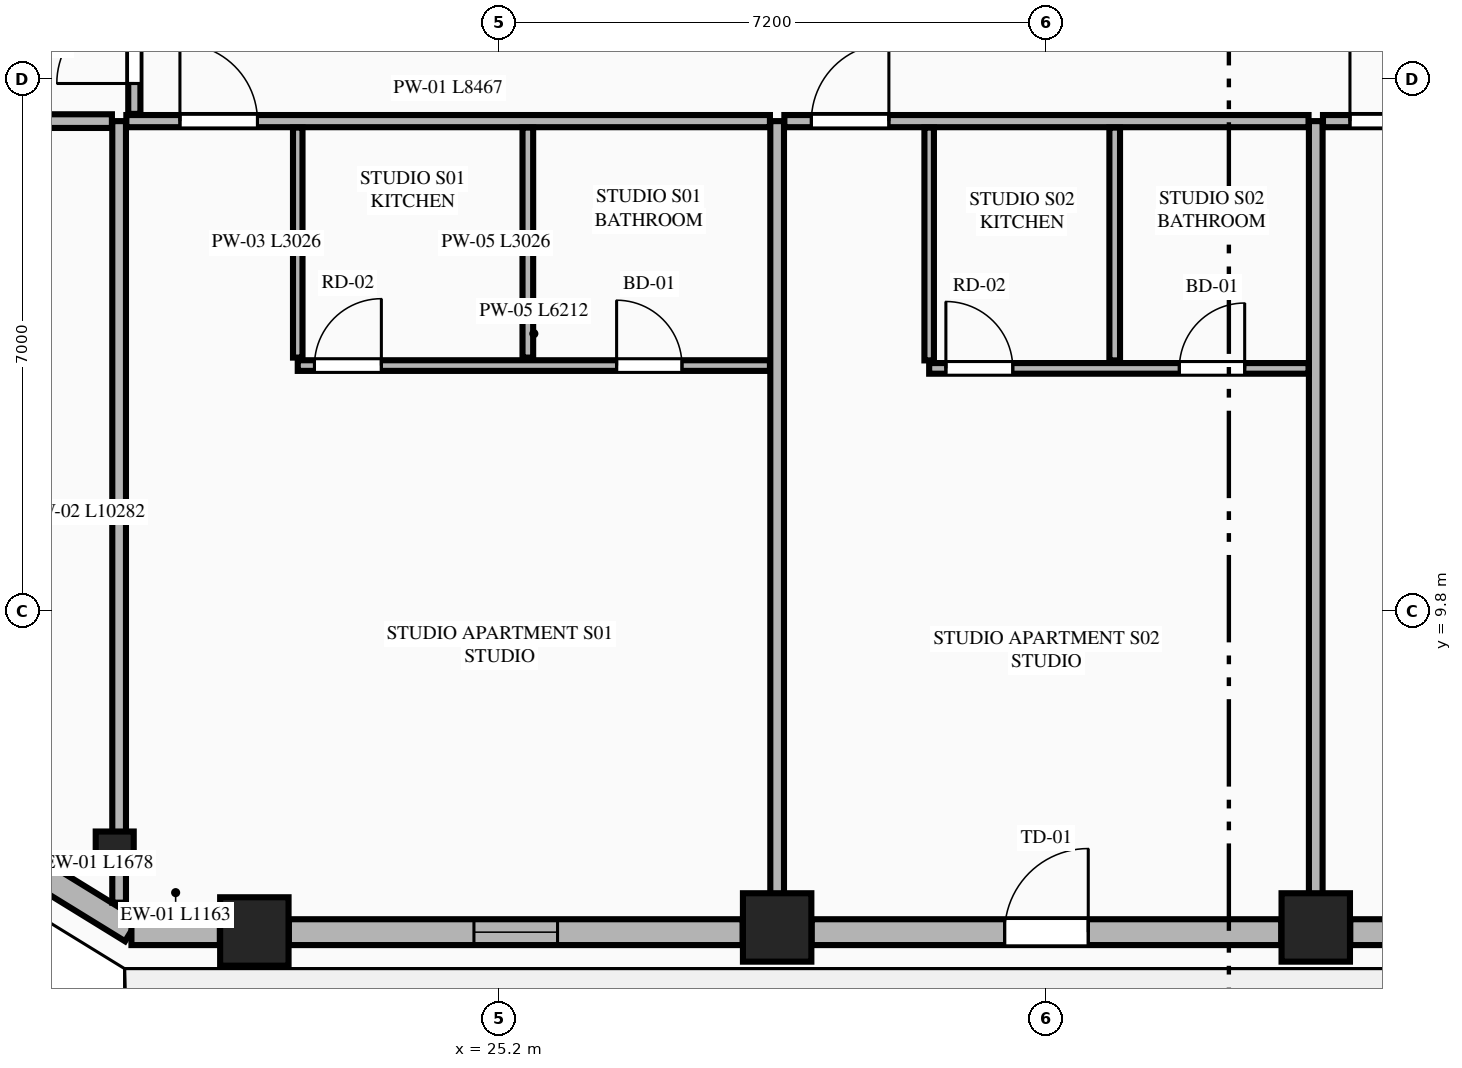
"""IFC4 building model, lengths in metres.
Left out: names, types, materials, properties, quantities, classifications, styles, units other than length and angle.
Written with IfcOpenShell. Run it as: python <this file> out.ifc"""

import sys

from ifc_helpers import new_model, si_unit, direction, frame, frame_2d, origin, origin_2d, place, context, subcontext, project, spatial, rectangle, extrude, element, fill, save


model = new_model("IFC4")
c1 = context("Model", 3, precision=1e-05, world=origin(), true_north=direction((0.0, 1.0)))
c2 = subcontext(c1, "Body", "Model", "MODEL_VIEW")
j1 = project(units=[si_unit("LENGTHUNIT", "METRE"), si_unit("PLANEANGLEUNIT", "RADIAN")], contexts=[c1])
p1 = place(None, origin())
s1 = spatial("IfcSite", under=j1, at=p1, CompositionType="ELEMENT")
p2 = place(p1, origin())
s2 = spatial("IfcBuilding", under=s1, at=p2, CompositionType="ELEMENT")
p3 = place(p2, frame((0.0, 0.0, 203.85)))
s3 = spatial("IfcBuildingStorey", under=s2, at=p3, CompositionType="ELEMENT", Elevation=203.85)
for number, where, z_axis, x_axis in (
    (1, (21.979, 5.589, 0.0), (0.0, 0.0, 1.0), (1.0, 0.0, 0.0)),
    (2, (28.857, 5.642, 0.0), (0.0, 0.0, 1.0), (1.0, 0.0, 0.0)),
    (3, (35.943, 5.642, 0.0), (0.0, 0.0, 1.0), (1.0, 0.0, 0.0)),
):
    element("IfcColumn", number, at=place(p3, frame(where, z_axis=z_axis, x_axis=x_axis)), inside=s3, PredefinedType="COLUMN", context=c2, shape_type="SweptSolid", body=[
        extrude(rectangle(XDim=0.9, YDim=0.9, at=origin_2d()), origin(), (0.0, 0.0, 1.0), 3.55),
    ])
p4 = place(p3, frame((20.142, 6.654, 0.0), z_axis=(0.0, 0.0, 1.0), x_axis=(0.865230187018, -0.501374833306, 0.0)))
e4 = element("IfcColumn", 4, at=p4, inside=s3, PredefinedType="PILASTER", context=c2, shape_type="SweptSolid", body=[
    extrude(rectangle(XDim=0.5, YDim=0.35, at=origin_2d()), origin(), (0.0, 0.0, 1.0), 3.55),
])
p5 = place(p3, frame((18.938, 6.484, 0.0), z_axis=(0.0, 0.0, 1.0), x_axis=(0.851778214877, -0.523902541185, 0.0)))
e5 = element("IfcWall", 5, at=p5, inside=s3, PredefinedType="STANDARD", context=c2, shape_type="SweptSolid", body=[
    extrude(rectangle(XDim=1.678, YDim=0.34, at=frame_2d((0.839, 0.0))), origin(), (0.0, 0.0, 1.0), 3.35),
])
p6 = place(p3, frame((20.362, 5.58, 0.0), z_axis=(0.0, 0.0, 1.0), x_axis=(1.0, 0.0, 0.0)))
e6 = element("IfcWall", 6, at=p6, inside=s3, PredefinedType="STANDARD", context=c2, shape_type="SweptSolid", body=[
    extrude(rectangle(XDim=1.163, YDim=0.34, at=frame_2d((0.582, 0.0))), origin(), (0.0, 0.0, 1.0), 3.35),
])
p7 = place(p3, frame((22.433, 5.58, 0.0), z_axis=(0.0, 0.0, 1.0), x_axis=(1.0, 0.0, 0.0)))
e7 = element("IfcWall", 7, at=p7, inside=s3, PredefinedType="STANDARD", context=c2, shape_type="SweptSolid", body=[
    extrude(rectangle(XDim=5.97, YDim=0.34, at=frame_2d((2.985, 0.0))), origin(), (0.0, 0.0, 1.0), 2.883),
])
p8 = place(p7, frame((2.435, 0.0, 0.75)))
e8 = element("IfcOpeningElement", 8, at=p8, cuts=e7, PredefinedType="OPENING", context=c2, shape_type="SweptSolid", body=[
    extrude(rectangle(XDim=1.1, YDim=1.983, at=frame_2d((0.55, 0.991))), frame((0.0, 0.18, 0.0), z_axis=(0.0, -1.0, 0.0), x_axis=(1.0, 0.0, 0.0)), (0.0, 0.0, 1.0), 0.36),
])
p9 = place(p3, frame((29.311, 5.58, 0.0), z_axis=(0.0, 0.0, 1.0), x_axis=(1.0, 0.0, 0.0)))
e9 = element("IfcWall", 9, at=p9, inside=s3, PredefinedType="STANDARD", context=c2, shape_type="SweptSolid", body=[
    extrude(rectangle(XDim=6.178, YDim=0.34, at=frame_2d((3.089, 0.0))), origin(), (0.0, 0.0, 1.0), 2.883),
])
p10 = place(p9, frame((2.539, 0.0, 0.0)))
e10 = element("IfcOpeningElement", 10, at=p10, cuts=e9, PredefinedType="OPENING", context=c2, shape_type="SweptSolid", body=[
    extrude(rectangle(XDim=1.1, YDim=2.25, at=frame_2d((0.55, 1.125))), frame((0.0, 0.18, 0.0), z_axis=(0.0, -1.0, 0.0), x_axis=(1.0, 0.0, 0.0)), (0.0, 0.0, 1.0), 0.36),
])
p11 = place(p3, frame((36.397, 5.58, 0.0), z_axis=(0.0, 0.0, 1.0), x_axis=(1.0, 0.0, 0.0)))
e11 = element("IfcWall", 11, at=p11, inside=s3, PredefinedType="STANDARD", context=c2, shape_type="SweptSolid", body=[
    extrude(rectangle(XDim=5.97, YDim=0.34, at=frame_2d((2.985, 0.0))), origin(), (0.0, 0.0, 1.0), 2.883),
])
p12 = place(p11, frame((2.36, 0.0, 0.75)))
e12 = element("IfcOpeningElement", 12, at=p12, cuts=e11, PredefinedType="OPENING", context=c2, shape_type="SweptSolid", body=[
    extrude(rectangle(XDim=1.25, YDim=1.95, at=frame_2d((0.625, 0.975))), frame((0.0, 0.18, 0.0), z_axis=(0.0, -1.0, 0.0), x_axis=(1.0, 0.0, 0.0)), (0.0, 0.0, 1.0), 0.36),
])
p13 = place(p3, frame((20.2, 5.968, 0.0), z_axis=(0.0, 0.0, 1.0), x_axis=(0.0, 1.0, 0.0)))
e13 = element("IfcWall", 13, at=p13, inside=s3, PredefinedType="PARTITIONING", context=c2, shape_type="SweptSolid", body=[
    extrude(rectangle(XDim=10.282, YDim=0.18, at=frame_2d((5.141, 0.0))), origin(), (0.0, 0.0, 1.0), 3.35),
])
for number, where, z_axis, x_axis in (
    (14, (28.857, 5.755, 0.0), (0.0, 0.0, 1.0), (0.0, 1.0, 0.0)),
    (15, (35.943, 5.755, 0.0), (0.0, 0.0, 1.0), (0.0, 1.0, 0.0)),
):
    element("IfcWall", number, at=place(p3, frame(where, z_axis=z_axis, x_axis=x_axis)), inside=s3, PredefinedType="PARTITIONING", context=c2, shape_type="SweptSolid", body=[
        extrude(rectangle(XDim=10.495, YDim=0.18, at=frame_2d((5.248, 0.0))), origin(), (0.0, 0.0, 1.0), 2.807),
    ])
p14 = place(p3, frame((20.295, 16.25, 0.0), z_axis=(0.0, 0.0, 1.0), x_axis=(1.0, 0.0, 0.0)))
e16 = element("IfcWall", 16, at=p14, inside=s3, PredefinedType="PARTITIONING", context=c2, shape_type="SweptSolid", body=[
    extrude(rectangle(XDim=8.467, YDim=0.16, at=frame_2d((4.233, 0.0))), origin(), (0.0, 0.0, 1.0), 3.35),
])
p15 = place(p14, frame((0.705, 0.0, 0.0)))
e17 = element("IfcOpeningElement", 17, at=p15, cuts=e16, PredefinedType="OPENING", context=c2, shape_type="SweptSolid", body=[
    extrude(rectangle(XDim=1.02, YDim=2.25, at=frame_2d((0.51, 1.125))), frame((0.0, 0.09, 0.0), z_axis=(0.0, -1.0, 0.0), x_axis=(1.0, 0.0, 0.0)), (0.0, 0.0, 1.0), 0.18),
])
p16 = place(p3, frame((22.55, 13.139, 0.0), z_axis=(0.0, 0.0, 1.0), x_axis=(0.0, 1.0, 0.0)))
e18 = element("IfcWall", 18, at=p16, inside=s3, PredefinedType="PARTITIONING", context=c2, shape_type="SweptSolid", body=[
    extrude(rectangle(XDim=3.026, YDim=0.125, at=frame_2d((1.513, 0.0))), origin(), (0.0, 0.0, 1.0), 2.807),
])
p17 = place(p3, frame((22.55, 13.034, 0.0), z_axis=(0.0, 0.0, 1.0), x_axis=(1.0, 0.0, 0.0)))
e19 = element("IfcWall", 19, at=p17, inside=s3, PredefinedType="PLUMBINGWALL", context=c2, shape_type="SweptSolid", body=[
    extrude(rectangle(XDim=6.212, YDim=0.14, at=frame_2d((3.106, 0.0))), origin(), (0.0, 0.0, 1.0), 3.35),
])
p18 = place(p17, frame((4.195, 0.0, 0.0)))
e20 = element("IfcOpeningElement", 20, at=p18, cuts=e19, PredefinedType="OPENING", context=c2, shape_type="SweptSolid", body=[
    extrude(rectangle(XDim=0.86, YDim=2.1, at=frame_2d((0.43, 1.05))), frame((0.0, 0.08, 0.0), z_axis=(0.0, -1.0, 0.0), x_axis=(1.0, 0.0, 0.0)), (0.0, 0.0, 1.0), 0.16),
])
p19 = place(p17, frame((0.22, 0.0, 0.0)))
e21 = element("IfcOpeningElement", 21, at=p19, cuts=e19, PredefinedType="OPENING", context=c2, shape_type="SweptSolid", body=[
    extrude(rectangle(XDim=0.88, YDim=2.15, at=frame_2d((0.44, 1.075))), frame((0.0, 0.08, 0.0), z_axis=(0.0, -1.0, 0.0), x_axis=(1.0, 0.0, 0.0)), (0.0, 0.0, 1.0), 0.16),
])
p20 = place(p3, frame((25.577, 13.139, 0.0), z_axis=(0.0, 0.0, 1.0), x_axis=(0.0, 1.0, 0.0)))
e22 = element("IfcWall", 22, at=p20, inside=s3, PredefinedType="PLUMBINGWALL", context=c2, shape_type="SweptSolid", body=[
    extrude(rectangle(XDim=3.026, YDim=0.14, at=frame_2d((1.513, 0.0))), origin(), (0.0, 0.0, 1.0), 3.35),
])
p21 = place(p3, frame((28.952, 16.25, 0.0), z_axis=(0.0, 0.0, 1.0), x_axis=(1.0, 0.0, 0.0)))
e23 = element("IfcWall", 23, at=p21, inside=s3, PredefinedType="PARTITIONING", context=c2, shape_type="SweptSolid", body=[
    extrude(rectangle(XDim=6.896, YDim=0.16, at=frame_2d((3.448, 0.0))), origin(), (0.0, 0.0, 1.0), 3.35),
])
p22 = place(p21, frame((0.355, 0.0, 0.0)))
e24 = element("IfcOpeningElement", 24, at=p22, cuts=e23, PredefinedType="OPENING", context=c2, shape_type="SweptSolid", body=[
    extrude(rectangle(XDim=1.02, YDim=2.25, at=frame_2d((0.51, 1.125))), frame((0.0, 0.09, 0.0), z_axis=(0.0, -1.0, 0.0), x_axis=(1.0, 0.0, 0.0)), (0.0, 0.0, 1.0), 0.18),
])
p23 = place(p3, frame((30.857, 13.102, 0.0), z_axis=(0.0, 0.0, 1.0), x_axis=(0.0, 1.0, 0.0)))
e25 = element("IfcWall", 25, at=p23, inside=s3, PredefinedType="PARTITIONING", context=c2, shape_type="SweptSolid", body=[
    extrude(rectangle(XDim=3.063, YDim=0.125, at=frame_2d((1.531, 0.0))), origin(), (0.0, 0.0, 1.0), 3.35),
])
p24 = place(p3, frame((30.857, 12.997, 0.0), z_axis=(0.0, 0.0, 1.0), x_axis=(1.0, 0.0, 0.0)))
e26 = element("IfcWall", 26, at=p24, inside=s3, PredefinedType="PLUMBINGWALL", context=c2, shape_type="SweptSolid", body=[
    extrude(rectangle(XDim=4.991, YDim=0.14, at=frame_2d((2.496, 0.0))), origin(), (0.0, 0.0, 1.0), 3.35),
])
p25 = place(p24, frame((3.291, 0.0, 0.0)))
e27 = element("IfcOpeningElement", 27, at=p25, cuts=e26, PredefinedType="OPENING", context=c2, shape_type="SweptSolid", body=[
    extrude(rectangle(XDim=0.86, YDim=2.1, at=frame_2d((0.43, 1.05))), frame((0.0, 0.08, 0.0), z_axis=(0.0, -1.0, 0.0), x_axis=(1.0, 0.0, 0.0)), (0.0, 0.0, 1.0), 0.16),
])
p26 = place(p24, frame((0.22, 0.0, 0.0)))
e28 = element("IfcOpeningElement", 28, at=p26, cuts=e26, PredefinedType="OPENING", context=c2, shape_type="SweptSolid", body=[
    extrude(rectangle(XDim=0.88, YDim=2.15, at=frame_2d((0.44, 1.075))), frame((0.0, 0.08, 0.0), z_axis=(0.0, -1.0, 0.0), x_axis=(1.0, 0.0, 0.0)), (0.0, 0.0, 1.0), 0.16),
])
p27 = place(p3, frame((33.298, 13.102, 0.0), z_axis=(0.0, 0.0, 1.0), x_axis=(0.0, 1.0, 0.0)))
e29 = element("IfcWall", 29, at=p27, inside=s3, PredefinedType="PLUMBINGWALL", context=c2, shape_type="SweptSolid", body=[
    extrude(rectangle(XDim=3.063, YDim=0.14, at=frame_2d((1.531, 0.0))), origin(), (0.0, 0.0, 1.0), 3.35),
])
p28 = place(p3, frame((36.038, 16.25, 0.0), z_axis=(0.0, 0.0, 1.0), x_axis=(1.0, 0.0, 0.0)))
e30 = element("IfcWall", 30, at=p28, inside=s3, PredefinedType="PARTITIONING", context=c2, shape_type="SweptSolid", body=[
    extrude(rectangle(XDim=8.467, YDim=0.16, at=frame_2d((4.233, 0.0))), origin(), (0.0, 0.0, 1.0), 3.35),
])
p29 = place(p28, frame((0.355, 0.0, 0.0)))
e31 = element("IfcOpeningElement", 31, at=p29, cuts=e30, PredefinedType="OPENING", context=c2, shape_type="SweptSolid", body=[
    extrude(rectangle(XDim=1.02, YDim=2.25, at=frame_2d((0.51, 1.125))), frame((0.0, 0.09, 0.0), z_axis=(0.0, -1.0, 0.0), x_axis=(1.0, 0.0, 0.0)), (0.0, 0.0, 1.0), 0.18),
])
p30 = place(p3, frame((14.211, 16.25, 0.0), z_axis=(0.0, 0.0, 1.0), x_axis=(1.0, 0.0, 0.0)))
e32 = element("IfcWall", 32, at=p30, inside=s3, PredefinedType="PARTITIONING", context=c2, shape_type="SweptSolid", body=[
    extrude(rectangle(XDim=5.894, YDim=0.18, at=frame_2d((2.947, 0.0))), origin(), (0.0, 0.0, 1.0), 3.35),
])
p31 = place(p3, frame((20.4, 16.345, 0.0), z_axis=(0.0, 0.0, 1.0), x_axis=(0.0, 1.0, 0.0)))
e33 = element("IfcWall", 33, at=p31, inside=s3, PredefinedType="PARTITIONING", context=c2, shape_type="SweptSolid", body=[
    extrude(rectangle(XDim=6.236, YDim=0.16, at=frame_2d((3.118, 0.0))), origin(), (0.0, 0.0, 1.0), 3.35),
])
p32 = place(p31, frame((0.4, 0.0, 0.0)))
e34 = element("IfcOpeningElement", 34, at=p32, cuts=e33, PredefinedType="OPENING", context=c2, shape_type="SweptSolid", body=[
    extrude(rectangle(XDim=1.02, YDim=2.25, at=frame_2d((0.51, 1.125))), frame((0.0, 0.09, 0.0), z_axis=(0.0, -1.0, 0.0), x_axis=(1.0, 0.0, 0.0)), (0.0, 0.0, 1.0), 0.18),
])
p33 = place(p8, origin())
e35 = element("IfcWindow", 35, at=p33, inside=s3, PartitioningType="SINGLE_PANEL", PredefinedType="WINDOW", context=c2, shape_type="SweptSolid", body=[
    extrude(rectangle(XDim=1.1, YDim=1.983, at=frame_2d((0.55, 0.991))), frame((0.0, 0.03, 0.0), z_axis=(0.0, -1.0, 0.0), x_axis=(1.0, 0.0, 0.0)), (0.0, 0.0, 1.0), 0.06),
])
fill(e8, e35)
p34 = place(p10, origin())
e36 = element("IfcDoor", 36, at=p34, inside=s3, OperationType="SINGLE_SWING_RIGHT", PredefinedType="DOOR", context=c2, shape_type="SweptSolid", body=[
    extrude(rectangle(XDim=1.1, YDim=2.25, at=frame_2d((0.55, 1.125))), frame((0.0, 0.025, 0.0), z_axis=(0.0, -1.0, 0.0), x_axis=(1.0, 0.0, 0.0)), (0.0, 0.0, 1.0), 0.05),
])
fill(e10, e36)
p35 = place(p18, origin())
e37 = element("IfcDoor", 37, at=p35, inside=s3, OperationType="SINGLE_SWING_LEFT", PredefinedType="DOOR", context=c2, shape_type="SweptSolid", body=[
    extrude(rectangle(XDim=0.86, YDim=2.1, at=frame_2d((0.43, 1.05))), frame((0.0, 0.025, 0.0), z_axis=(0.0, -1.0, 0.0), x_axis=(1.0, 0.0, 0.0)), (0.0, 0.0, 1.0), 0.05),
])
fill(e20, e37)
p36 = place(p15, origin())
e38 = element("IfcDoor", 38, at=p36, inside=s3, OperationType="SINGLE_SWING_LEFT", PredefinedType="DOOR", context=c2, shape_type="SweptSolid", body=[
    extrude(rectangle(XDim=1.02, YDim=2.25, at=frame_2d((0.51, 1.125))), frame((0.0, 0.025, 0.0), z_axis=(0.0, -1.0, 0.0), x_axis=(1.0, 0.0, 0.0)), (0.0, 0.0, 1.0), 0.05),
])
fill(e17, e38)
p37 = place(p19, origin())
e39 = element("IfcDoor", 39, at=p37, inside=s3, OperationType="SINGLE_SWING_RIGHT", PredefinedType="DOOR", context=c2, shape_type="SweptSolid", body=[
    extrude(rectangle(XDim=0.88, YDim=2.15, at=frame_2d((0.44, 1.075))), frame((0.0, 0.025, 0.0), z_axis=(0.0, -1.0, 0.0), x_axis=(1.0, 0.0, 0.0)), (0.0, 0.0, 1.0), 0.05),
])
fill(e21, e39)
p38 = place(p25, origin())
e40 = element("IfcDoor", 40, at=p38, inside=s3, OperationType="SINGLE_SWING_RIGHT", PredefinedType="DOOR", context=c2, shape_type="SweptSolid", body=[
    extrude(rectangle(XDim=0.86, YDim=2.1, at=frame_2d((0.43, 1.05))), frame((0.0, 0.025, 0.0), z_axis=(0.0, -1.0, 0.0), x_axis=(1.0, 0.0, 0.0)), (0.0, 0.0, 1.0), 0.05),
])
fill(e27, e40)
p39 = place(p22, origin())
e41 = element("IfcDoor", 41, at=p39, inside=s3, OperationType="SINGLE_SWING_RIGHT", PredefinedType="DOOR", context=c2, shape_type="SweptSolid", body=[
    extrude(rectangle(XDim=1.02, YDim=2.25, at=frame_2d((0.51, 1.125))), frame((0.0, 0.025, 0.0), z_axis=(0.0, -1.0, 0.0), x_axis=(1.0, 0.0, 0.0)), (0.0, 0.0, 1.0), 0.05),
])
fill(e24, e41)
p40 = place(p26, origin())
e42 = element("IfcDoor", 42, at=p40, inside=s3, OperationType="SINGLE_SWING_LEFT", PredefinedType="DOOR", context=c2, shape_type="SweptSolid", body=[
    extrude(rectangle(XDim=0.88, YDim=2.15, at=frame_2d((0.44, 1.075))), frame((0.0, 0.025, 0.0), z_axis=(0.0, -1.0, 0.0), x_axis=(1.0, 0.0, 0.0)), (0.0, 0.0, 1.0), 0.05),
])
fill(e28, e42)
p41 = place(p29, origin())
e43 = element("IfcDoor", 43, at=p41, inside=s3, OperationType="SINGLE_SWING_LEFT", PredefinedType="DOOR", context=c2, shape_type="SweptSolid", body=[
    extrude(rectangle(XDim=1.02, YDim=2.25, at=frame_2d((0.51, 1.125))), frame((0.0, 0.025, 0.0), z_axis=(0.0, -1.0, 0.0), x_axis=(1.0, 0.0, 0.0)), (0.0, 0.0, 1.0), 0.05),
])
fill(e31, e43)
p42 = place(p32, origin())
e44 = element("IfcDoor", 44, at=p42, inside=s3, OperationType="SINGLE_SWING_LEFT", PredefinedType="DOOR", context=c2, shape_type="SweptSolid", body=[
    extrude(rectangle(XDim=1.02, YDim=2.25, at=frame_2d((0.51, 1.125))), frame((0.0, 0.025, 0.0), z_axis=(0.0, -1.0, 0.0), x_axis=(1.0, 0.0, 0.0)), (0.0, 0.0, 1.0), 0.05),
])
fill(e34, e44)
save(model, sys.argv[1])
